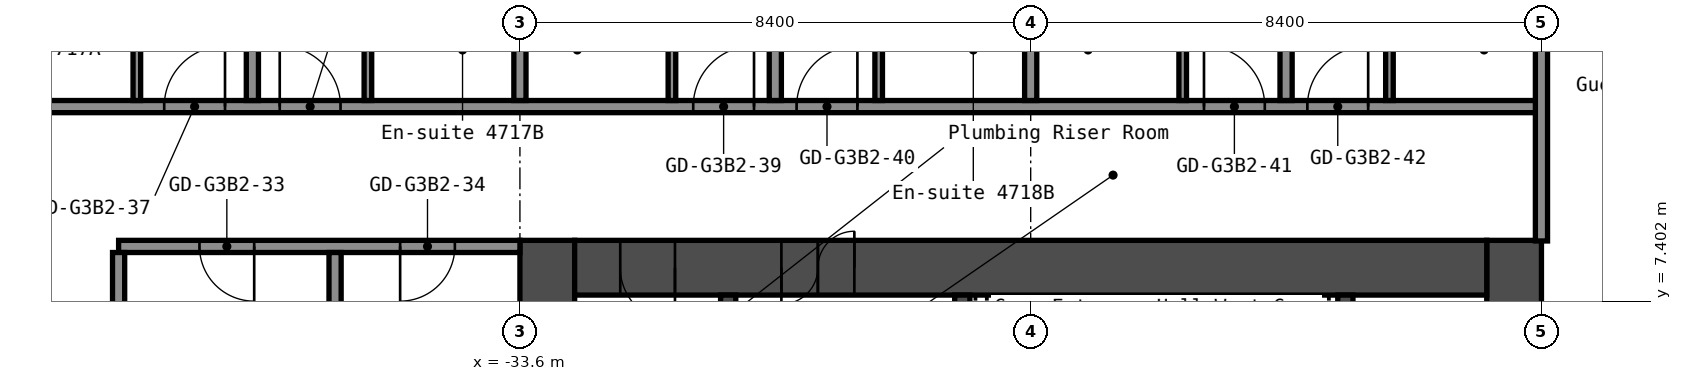
"""IFC4 building model, lengths in metres.
Left out: names, types, materials, properties, quantities, classifications, styles, units other than length and angle.
Written with IfcOpenShell. Run it as: python <this file> out.ifc"""

import sys

from ifc_helpers import new_model, si_unit, direction, frame, frame_2d, origin, place, context, subcontext, project, spatial, rectangle, extrude, element, fill, save


model = new_model("IFC4")
c1 = context("Model", 3, precision=1e-05, world=origin(), true_north=direction((0.0, 1.0)))
c2 = subcontext(c1, "Body", "Model", "MODEL_VIEW")
j1 = project(units=[si_unit("LENGTHUNIT", "METRE"), si_unit("PLANEANGLEUNIT", "RADIAN")], contexts=[c1])
p1 = place(None, origin())
s1 = spatial("IfcSite", under=j1, at=p1, CompositionType="ELEMENT")
p2 = place(p1, origin())
s2 = spatial("IfcBuilding", under=s1, at=p2, CompositionType="ELEMENT")
p3 = place(p2, frame((0.0, 0.0, 166.2)))
s3 = spatial("IfcBuildingStorey", under=s2, at=p3, CompositionType="ELEMENT", Elevation=166.2)
p4 = place(p3, frame((-17.25, -8.4, 0.0), z_axis=(0.0, 0.0, 1.0), x_axis=(0.0, 1.0, 0.0)))
e1 = element("IfcWall", 1, at=p4, inside=s3, PredefinedType="SHEAR", context=c2, shape_type="SweptSolid", body=[
    extrude(rectangle(XDim=16.8, YDim=0.9, at=frame_2d((8.4, 0.0))), origin(), (0.0, 0.0, 1.0), 2.75),
])
p5 = place(p4, frame((7.1, 0.0, 0.0)))
e2 = element("IfcOpeningElement", 2, at=p5, cuts=e1, PredefinedType="OPENING", context=c2, shape_type="SweptSolid", body=[
    extrude(rectangle(XDim=1.6, YDim=2.1, at=frame_2d((0.8, 1.05))), frame((0.0, 0.46, 0.0), z_axis=(0.0, -1.0, 0.0), x_axis=(1.0, 0.0, 0.0)), (0.0, 0.0, 1.0), 0.92),
])
p6 = place(p3, frame((-33.15, -8.4, 0.0), z_axis=(0.0, 0.0, 1.0), x_axis=(0.0, 1.0, 0.0)))
e3 = element("IfcWall", 3, at=p6, inside=s3, PredefinedType="SHEAR", context=c2, shape_type="SweptSolid", body=[
    extrude(rectangle(XDim=16.8, YDim=0.9, at=frame_2d((8.4, 0.0))), origin(), (0.0, 0.0, 1.0), 2.75),
])
p7 = place(p3, frame((-32.7, 7.95, 0.0), z_axis=(0.0, 0.0, 1.0), x_axis=(1.0, 0.0, 0.0)))
e4 = element("IfcWall", 4, at=p7, inside=s3, PredefinedType="SHEAR", context=c2, shape_type="SweptSolid", body=[
    extrude(rectangle(XDim=15.0, YDim=0.9, at=frame_2d((7.5, 0.0))), origin(), (0.0, 0.0, 1.0), 2.75),
])
p8 = place(p7, frame((3.4, 0.0, 0.0)))
e5 = element("IfcOpeningElement", 5, at=p8, cuts=e4, PredefinedType="OPENING", context=c2, shape_type="SweptSolid", body=[
    extrude(rectangle(XDim=1.2, YDim=2.1, at=frame_2d((0.6, 1.05))), frame((0.0, 0.46, 0.0), z_axis=(0.0, -1.0, 0.0), x_axis=(1.0, 0.0, 0.0)), (0.0, 0.0, 1.0), 0.92),
])
p9 = place(p7, frame((0.75, 0.0, 0.0)))
e6 = element("IfcOpeningElement", 6, at=p9, cuts=e4, PredefinedType="OPENING", context=c2, shape_type="SweptSolid", body=[
    extrude(rectangle(XDim=0.9, YDim=2.1, at=frame_2d((0.45, 1.05))), frame((0.0, 0.46, 0.0), z_axis=(0.0, -1.0, 0.0), x_axis=(1.0, 0.0, 0.0)), (0.0, 0.0, 1.0), 0.92),
])
p10 = place(p3, frame((-20.025, 1.2, 0.0), z_axis=(0.0, 0.0, 1.0), x_axis=(0.0, 1.0, 0.0)))
e7 = element("IfcWall", 7, at=p10, inside=s3, PredefinedType="SHEAR", context=c2, shape_type="SweptSolid", body=[
    extrude(rectangle(XDim=6.3, YDim=0.25, at=frame_2d((3.15, 0.0))), origin(), (0.0, 0.0, 1.0), 2.75),
])
p11 = place(p3, frame((-26.325, 3.75, 0.0), z_axis=(0.0, 0.0, 1.0), x_axis=(0.0, 1.0, 0.0)))
e8 = element("IfcWall", 8, at=p11, inside=s3, PredefinedType="SHEAR", context=c2, shape_type="SweptSolid", body=[
    extrude(rectangle(XDim=3.75, YDim=0.25, at=frame_2d((1.875, 0.0))), origin(), (0.0, 0.0, 1.0), 2.75),
])
p12 = place(p11, frame((1.25, 0.0, 0.0)))
e9 = element("IfcOpeningElement", 9, at=p12, cuts=e8, PredefinedType="OPENING", context=c2, shape_type="SweptSolid", body=[
    extrude(rectangle(XDim=1.2, YDim=2.1, at=frame_2d((0.6, 1.05))), frame((0.0, 0.135, 0.0), z_axis=(0.0, -1.0, 0.0), x_axis=(1.0, 0.0, 0.0)), (0.0, 0.0, 1.0), 0.27),
])
p13 = place(p3, frame((-30.175, 1.45, 0.0), z_axis=(0.0, 0.0, 1.0), x_axis=(0.0, 1.0, 0.0)))
e10 = element("IfcWall", 10, at=p13, inside=s3, PredefinedType="SHEAR", context=c2, shape_type="SweptSolid", body=[
    extrude(rectangle(XDim=6.05, YDim=0.25, at=frame_2d((3.025, 0.0))), origin(), (0.0, 0.0, 1.0), 2.75),
])
p14 = place(p13, frame((2.625, 0.0, 0.0)))
e11 = element("IfcOpeningElement", 11, at=p14, cuts=e10, PredefinedType="OPENING", context=c2, shape_type="SweptSolid", body=[
    extrude(rectangle(XDim=1.1, YDim=2.1, at=frame_2d((0.55, 1.05))), frame((0.0, 0.135, 0.0), z_axis=(0.0, -1.0, 0.0), x_axis=(1.0, 0.0, 0.0)), (0.0, 0.0, 1.0), 0.27),
])
p15 = place(p3, frame((-40.2, 8.3, 0.0), z_axis=(0.0, 0.0, 1.0), x_axis=(1.0, 0.0, 0.0)))
e12 = element("IfcWall", 12, at=p15, inside=s3, PredefinedType="PARTITIONING", context=c2, shape_type="SweptSolid", body=[
    extrude(rectangle(XDim=6.6, YDim=0.2, at=frame_2d((3.3, 0.0))), origin(), (0.0, 0.0, 1.0), 2.75),
])
p16 = place(p15, frame((1.33, 0.0, 0.0)))
e13 = element("IfcOpeningElement", 13, at=p16, cuts=e12, PredefinedType="OPENING", context=c2, shape_type="SweptSolid", body=[
    extrude(rectangle(XDim=0.9, YDim=2.1, at=frame_2d((0.45, 1.05))), frame((0.0, 0.11, 0.0), z_axis=(0.0, -1.0, 0.0), x_axis=(1.0, 0.0, 0.0)), (0.0, 0.0, 1.0), 0.22),
])
p17 = place(p15, frame((4.63, 0.0, 0.0)))
e14 = element("IfcOpeningElement", 14, at=p17, cuts=e12, PredefinedType="OPENING", context=c2, shape_type="SweptSolid", body=[
    extrude(rectangle(XDim=0.9, YDim=2.1, at=frame_2d((0.45, 1.05))), frame((0.0, 0.11, 0.0), z_axis=(0.0, -1.0, 0.0), x_axis=(1.0, 0.0, 0.0)), (0.0, 0.0, 1.0), 0.22),
])
p18 = place(p3, frame((-42.7, 10.6, 0.0), z_axis=(0.0, 0.0, 1.0), x_axis=(1.0, 0.0, 0.0)))
e15 = element("IfcWall", 15, at=p18, inside=s3, PredefinedType="PARTITIONING", context=c2, shape_type="SweptSolid", body=[
    extrude(rectangle(XDim=25.9, YDim=0.2, at=frame_2d((12.95, 0.0))), origin(), (0.0, 0.0, 1.0), 2.75),
])
p19 = place(p18, frame((3.25, 0.0, 0.0)))
e16 = element("IfcOpeningElement", 16, at=p19, cuts=e15, PredefinedType="OPENING", context=c2, shape_type="SweptSolid", body=[
    extrude(rectangle(XDim=1.0, YDim=2.1, at=frame_2d((0.5, 1.05))), frame((0.0, 0.11, 0.0), z_axis=(0.0, -1.0, 0.0), x_axis=(1.0, 0.0, 0.0)), (0.0, 0.0, 1.0), 0.22),
])
p20 = place(p18, frame((5.15, 0.0, 0.0)))
e17 = element("IfcOpeningElement", 17, at=p20, cuts=e15, PredefinedType="OPENING", context=c2, shape_type="SweptSolid", body=[
    extrude(rectangle(XDim=1.0, YDim=2.1, at=frame_2d((0.5, 1.05))), frame((0.0, 0.11, 0.0), z_axis=(0.0, -1.0, 0.0), x_axis=(1.0, 0.0, 0.0)), (0.0, 0.0, 1.0), 0.22),
])
p21 = place(p18, frame((11.95, 0.0, 0.0)))
e18 = element("IfcOpeningElement", 18, at=p21, cuts=e15, PredefinedType="OPENING", context=c2, shape_type="SweptSolid", body=[
    extrude(rectangle(XDim=1.0, YDim=2.1, at=frame_2d((0.5, 1.05))), frame((0.0, 0.11, 0.0), z_axis=(0.0, -1.0, 0.0), x_axis=(1.0, 0.0, 0.0)), (0.0, 0.0, 1.0), 0.22),
])
p22 = place(p18, frame((13.65, 0.0, 0.0)))
e19 = element("IfcOpeningElement", 19, at=p22, cuts=e15, PredefinedType="OPENING", context=c2, shape_type="SweptSolid", body=[
    extrude(rectangle(XDim=1.0, YDim=2.1, at=frame_2d((0.5, 1.05))), frame((0.0, 0.11, 0.0), z_axis=(0.0, -1.0, 0.0), x_axis=(1.0, 0.0, 0.0)), (0.0, 0.0, 1.0), 0.22),
])
p23 = place(p18, frame((20.35, 0.0, 0.0)))
e20 = element("IfcOpeningElement", 20, at=p23, cuts=e15, PredefinedType="OPENING", context=c2, shape_type="SweptSolid", body=[
    extrude(rectangle(XDim=1.0, YDim=2.1, at=frame_2d((0.5, 1.05))), frame((0.0, 0.11, 0.0), z_axis=(0.0, -1.0, 0.0), x_axis=(1.0, 0.0, 0.0)), (0.0, 0.0, 1.0), 0.22),
])
p24 = place(p18, frame((22.05, 0.0, 0.0)))
e21 = element("IfcOpeningElement", 21, at=p24, cuts=e15, PredefinedType="OPENING", context=c2, shape_type="SweptSolid", body=[
    extrude(rectangle(XDim=1.0, YDim=2.1, at=frame_2d((0.5, 1.05))), frame((0.0, 0.11, 0.0), z_axis=(0.0, -1.0, 0.0), x_axis=(1.0, 0.0, 0.0)), (0.0, 0.0, 1.0), 0.22),
])
p25 = place(p3, frame((-40.2, -8.2, 0.0), z_axis=(0.0, 0.0, 1.0), x_axis=(0.0, 1.0, 0.0)))
e22 = element("IfcWall", 22, at=p25, inside=s3, PredefinedType="PARTITIONING", context=c2, shape_type="SweptSolid", body=[
    extrude(rectangle(XDim=16.4, YDim=0.2, at=frame_2d((8.2, 0.0))), origin(), (0.0, 0.0, 1.0), 2.75),
])
p26 = place(p3, frame((-39.9, 10.7, 0.0), z_axis=(0.0, 0.0, 1.0), x_axis=(0.0, 1.0, 0.0)))
e23 = element("IfcWall", 23, at=p26, inside=s3, PredefinedType="PARTITIONING", context=c2, shape_type="SweptSolid", body=[
    extrude(rectangle(XDim=2.9, YDim=0.125, at=frame_2d((1.45, 0.0))), origin(), (0.0, 0.0, 1.0), 2.75),
])
p27 = place(p26, frame((1.5, 0.0, 0.0)))
e24 = element("IfcOpeningElement", 24, at=p27, cuts=e23, PredefinedType="OPENING", context=c2, shape_type="SweptSolid", body=[
    extrude(rectangle(XDim=0.8, YDim=2.1, at=frame_2d((0.4, 1.05))), frame((0.0, 0.073, 0.0), z_axis=(0.0, -1.0, 0.0), x_axis=(1.0, 0.0, 0.0)), (0.0, 0.0, 1.0), 0.145),
])
p28 = place(p3, frame((-38.0, 10.7, 0.0), z_axis=(0.0, 0.0, 1.0), x_axis=(0.0, 1.0, 0.0)))
e25 = element("IfcWall", 25, at=p28, inside=s3, PredefinedType="PARTITIONING", context=c2, shape_type="SweptSolid", body=[
    extrude(rectangle(XDim=7.6, YDim=0.2, at=frame_2d((3.8, 0.0))), origin(), (0.0, 0.0, 1.0), 2.75),
])
p29 = place(p3, frame((-36.64, 0.0, 0.0), z_axis=(0.0, 0.0, 1.0), x_axis=(0.0, 1.0, 0.0)))
e26 = element("IfcWall", 26, at=p29, inside=s3, PredefinedType="PARTITIONING", context=c2, shape_type="SweptSolid", body=[
    extrude(rectangle(XDim=8.2, YDim=0.2, at=frame_2d((4.1, 0.0))), origin(), (0.0, 0.0, 1.0), 2.75),
])
p30 = place(p3, frame((-36.1, 10.7, 0.0), z_axis=(0.0, 0.0, 1.0), x_axis=(0.0, 1.0, 0.0)))
e27 = element("IfcWall", 27, at=p30, inside=s3, PredefinedType="PARTITIONING", context=c2, shape_type="SweptSolid", body=[
    extrude(rectangle(XDim=2.9, YDim=0.125, at=frame_2d((1.45, 0.0))), origin(), (0.0, 0.0, 1.0), 2.75),
])
p31 = place(p30, frame((1.5, 0.0, 0.0)))
e28 = element("IfcOpeningElement", 28, at=p31, cuts=e27, PredefinedType="OPENING", context=c2, shape_type="SweptSolid", body=[
    extrude(rectangle(XDim=0.8, YDim=2.1, at=frame_2d((0.4, 1.05))), frame((0.0, 0.073, 0.0), z_axis=(0.0, -1.0, 0.0), x_axis=(1.0, 0.0, 0.0)), (0.0, 0.0, 1.0), 0.145),
])
p32 = place(p3, frame((-33.6, 10.7, 0.0), z_axis=(0.0, 0.0, 1.0), x_axis=(0.0, 1.0, 0.0)))
e29 = element("IfcWall", 29, at=p32, inside=s3, PredefinedType="PARTITIONING", context=c2, shape_type="SweptSolid", body=[
    extrude(rectangle(XDim=7.6, YDim=0.2, at=frame_2d((3.8, 0.0))), origin(), (0.0, 0.0, 1.0), 2.75),
])
p33 = place(p3, frame((-31.1, 10.7, 0.0), z_axis=(0.0, 0.0, 1.0), x_axis=(0.0, 1.0, 0.0)))
e30 = element("IfcWall", 30, at=p33, inside=s3, PredefinedType="PARTITIONING", context=c2, shape_type="SweptSolid", body=[
    extrude(rectangle(XDim=2.9, YDim=0.125, at=frame_2d((1.45, 0.0))), origin(), (0.0, 0.0, 1.0), 2.75),
])
p34 = place(p33, frame((1.5, 0.0, 0.0)))
e31 = element("IfcOpeningElement", 31, at=p34, cuts=e30, PredefinedType="OPENING", context=c2, shape_type="SweptSolid", body=[
    extrude(rectangle(XDim=0.8, YDim=2.1, at=frame_2d((0.4, 1.05))), frame((0.0, 0.073, 0.0), z_axis=(0.0, -1.0, 0.0), x_axis=(1.0, 0.0, 0.0)), (0.0, 0.0, 1.0), 0.145),
])
p35 = place(p3, frame((-29.4, 10.7, 0.0), z_axis=(0.0, 0.0, 1.0), x_axis=(0.0, 1.0, 0.0)))
e32 = element("IfcWall", 32, at=p35, inside=s3, PredefinedType="PARTITIONING", context=c2, shape_type="SweptSolid", body=[
    extrude(rectangle(XDim=7.6, YDim=0.2, at=frame_2d((3.8, 0.0))), origin(), (0.0, 0.0, 1.0), 2.75),
])
p36 = place(p3, frame((-27.7, 10.7, 0.0), z_axis=(0.0, 0.0, 1.0), x_axis=(0.0, 1.0, 0.0)))
e33 = element("IfcWall", 33, at=p36, inside=s3, PredefinedType="PARTITIONING", context=c2, shape_type="SweptSolid", body=[
    extrude(rectangle(XDim=2.9, YDim=0.125, at=frame_2d((1.45, 0.0))), origin(), (0.0, 0.0, 1.0), 2.75),
])
p37 = place(p36, frame((1.5, 0.0, 0.0)))
e34 = element("IfcOpeningElement", 34, at=p37, cuts=e33, PredefinedType="OPENING", context=c2, shape_type="SweptSolid", body=[
    extrude(rectangle(XDim=0.8, YDim=2.1, at=frame_2d((0.4, 1.05))), frame((0.0, 0.073, 0.0), z_axis=(0.0, -1.0, 0.0), x_axis=(1.0, 0.0, 0.0)), (0.0, 0.0, 1.0), 0.145),
])
p38 = place(p3, frame((-25.2, 10.7, 0.0), z_axis=(0.0, 0.0, 1.0), x_axis=(0.0, 1.0, 0.0)))
e35 = element("IfcWall", 35, at=p38, inside=s3, PredefinedType="PARTITIONING", context=c2, shape_type="SweptSolid", body=[
    extrude(rectangle(XDim=7.6, YDim=0.2, at=frame_2d((3.8, 0.0))), origin(), (0.0, 0.0, 1.0), 2.75),
])
p39 = place(p3, frame((-22.7, 10.7, 0.0), z_axis=(0.0, 0.0, 1.0), x_axis=(0.0, 1.0, 0.0)))
e36 = element("IfcWall", 36, at=p39, inside=s3, PredefinedType="PARTITIONING", context=c2, shape_type="SweptSolid", body=[
    extrude(rectangle(XDim=2.9, YDim=0.125, at=frame_2d((1.45, 0.0))), origin(), (0.0, 0.0, 1.0), 2.75),
])
p40 = place(p39, frame((1.5, 0.0, 0.0)))
e37 = element("IfcOpeningElement", 37, at=p40, cuts=e36, PredefinedType="OPENING", context=c2, shape_type="SweptSolid", body=[
    extrude(rectangle(XDim=0.8, YDim=2.1, at=frame_2d((0.4, 1.05))), frame((0.0, 0.073, 0.0), z_axis=(0.0, -1.0, 0.0), x_axis=(1.0, 0.0, 0.0)), (0.0, 0.0, 1.0), 0.145),
])
p41 = place(p3, frame((-21.0, 10.7, 0.0), z_axis=(0.0, 0.0, 1.0), x_axis=(0.0, 1.0, 0.0)))
e38 = element("IfcWall", 38, at=p41, inside=s3, PredefinedType="PARTITIONING", context=c2, shape_type="SweptSolid", body=[
    extrude(rectangle(XDim=7.6, YDim=0.2, at=frame_2d((3.8, 0.0))), origin(), (0.0, 0.0, 1.0), 2.75),
])
p42 = place(p3, frame((-19.3, 10.7, 0.0), z_axis=(0.0, 0.0, 1.0), x_axis=(0.0, 1.0, 0.0)))
e39 = element("IfcWall", 39, at=p42, inside=s3, PredefinedType="PARTITIONING", context=c2, shape_type="SweptSolid", body=[
    extrude(rectangle(XDim=2.9, YDim=0.125, at=frame_2d((1.45, 0.0))), origin(), (0.0, 0.0, 1.0), 2.75),
])
p43 = place(p42, frame((1.5, 0.0, 0.0)))
e40 = element("IfcOpeningElement", 40, at=p43, cuts=e39, PredefinedType="OPENING", context=c2, shape_type="SweptSolid", body=[
    extrude(rectangle(XDim=0.8, YDim=2.1, at=frame_2d((0.4, 1.05))), frame((0.0, 0.073, 0.0), z_axis=(0.0, -1.0, 0.0), x_axis=(1.0, 0.0, 0.0)), (0.0, 0.0, 1.0), 0.145),
])
p44 = place(p3, frame((-16.8, 8.39, 0.0), z_axis=(0.0, 0.0, 1.0), x_axis=(0.0, 1.0, 0.0)))
e41 = element("IfcWall", 41, at=p44, inside=s3, PredefinedType="PARTITIONING", context=c2, shape_type="SweptSolid", body=[
    extrude(rectangle(XDim=9.91, YDim=0.2, at=frame_2d((4.955, 0.0))), origin(), (0.0, 0.0, 1.0), 2.75),
])
p45 = place(p8, origin())
e42 = element("IfcDoor", 42, at=p45, inside=s3, OperationType="DOUBLE_DOOR_SINGLE_SWING", PredefinedType="DOOR", context=c2, shape_type="SweptSolid", body=[
    extrude(rectangle(XDim=1.2, YDim=2.1, at=frame_2d((0.6, 1.05))), frame((0.0, 0.025, 0.0), z_axis=(0.0, -1.0, 0.0), x_axis=(1.0, 0.0, 0.0)), (0.0, 0.0, 1.0), 0.05),
])
fill(e5, e42)
p46 = place(p9, origin())
e43 = element("IfcDoor", 43, at=p46, inside=s3, OperationType="SINGLE_SWING_RIGHT", PredefinedType="DOOR", context=c2, shape_type="SweptSolid", body=[
    extrude(rectangle(XDim=0.9, YDim=2.1, at=frame_2d((0.45, 1.05))), frame((0.0, 0.025, 0.0), z_axis=(0.0, -1.0, 0.0), x_axis=(1.0, 0.0, 0.0)), (0.0, 0.0, 1.0), 0.05),
])
fill(e6, e43)
p47 = place(p16, origin())
e44 = element("IfcDoor", 44, at=p47, inside=s3, OperationType="SINGLE_SWING_RIGHT", PredefinedType="DOOR", context=c2, shape_type="SweptSolid", body=[
    extrude(rectangle(XDim=0.9, YDim=2.1, at=frame_2d((0.45, 1.05))), frame((0.0, 0.025, 0.0), z_axis=(0.0, -1.0, 0.0), x_axis=(1.0, 0.0, 0.0)), (0.0, 0.0, 1.0), 0.05),
])
fill(e13, e44)
p48 = place(p17, origin())
e45 = element("IfcDoor", 45, at=p48, inside=s3, OperationType="SINGLE_SWING_LEFT", PredefinedType="DOOR", context=c2, shape_type="SweptSolid", body=[
    extrude(rectangle(XDim=0.9, YDim=2.1, at=frame_2d((0.45, 1.05))), frame((0.0, 0.025, 0.0), z_axis=(0.0, -1.0, 0.0), x_axis=(1.0, 0.0, 0.0)), (0.0, 0.0, 1.0), 0.05),
])
fill(e14, e45)
p49 = place(p19, origin())
e46 = element("IfcDoor", 46, at=p49, inside=s3, OperationType="SINGLE_SWING_LEFT", PredefinedType="DOOR", context=c2, shape_type="SweptSolid", body=[
    extrude(rectangle(XDim=1.0, YDim=2.1, at=frame_2d((0.5, 1.05))), frame((0.0, 0.025, 0.0), z_axis=(0.0, -1.0, 0.0), x_axis=(1.0, 0.0, 0.0)), (0.0, 0.0, 1.0), 0.05),
])
fill(e16, e46)
p50 = place(p20, origin())
e47 = element("IfcDoor", 47, at=p50, inside=s3, OperationType="SINGLE_SWING_RIGHT", PredefinedType="DOOR", context=c2, shape_type="SweptSolid", body=[
    extrude(rectangle(XDim=1.0, YDim=2.1, at=frame_2d((0.5, 1.05))), frame((0.0, 0.025, 0.0), z_axis=(0.0, -1.0, 0.0), x_axis=(1.0, 0.0, 0.0)), (0.0, 0.0, 1.0), 0.05),
])
fill(e17, e47)
p51 = place(p21, origin())
e48 = element("IfcDoor", 48, at=p51, inside=s3, OperationType="SINGLE_SWING_LEFT", PredefinedType="DOOR", context=c2, shape_type="SweptSolid", body=[
    extrude(rectangle(XDim=1.0, YDim=2.1, at=frame_2d((0.5, 1.05))), frame((0.0, 0.025, 0.0), z_axis=(0.0, -1.0, 0.0), x_axis=(1.0, 0.0, 0.0)), (0.0, 0.0, 1.0), 0.05),
])
fill(e18, e48)
p52 = place(p22, origin())
e49 = element("IfcDoor", 49, at=p52, inside=s3, OperationType="SINGLE_SWING_LEFT", PredefinedType="DOOR", context=c2, shape_type="SweptSolid", body=[
    extrude(rectangle(XDim=1.0, YDim=2.1, at=frame_2d((0.5, 1.05))), frame((0.0, 0.025, 0.0), z_axis=(0.0, -1.0, 0.0), x_axis=(1.0, 0.0, 0.0)), (0.0, 0.0, 1.0), 0.05),
])
fill(e19, e49)
p53 = place(p23, origin())
e50 = element("IfcDoor", 50, at=p53, inside=s3, OperationType="SINGLE_SWING_RIGHT", PredefinedType="DOOR", context=c2, shape_type="SweptSolid", body=[
    extrude(rectangle(XDim=1.0, YDim=2.1, at=frame_2d((0.5, 1.05))), frame((0.0, 0.025, 0.0), z_axis=(0.0, -1.0, 0.0), x_axis=(1.0, 0.0, 0.0)), (0.0, 0.0, 1.0), 0.05),
])
fill(e20, e50)
p54 = place(p24, origin())
e51 = element("IfcDoor", 51, at=p54, inside=s3, OperationType="SINGLE_SWING_LEFT", PredefinedType="DOOR", context=c2, shape_type="SweptSolid", body=[
    extrude(rectangle(XDim=1.0, YDim=2.1, at=frame_2d((0.5, 1.05))), frame((0.0, 0.025, 0.0), z_axis=(0.0, -1.0, 0.0), x_axis=(1.0, 0.0, 0.0)), (0.0, 0.0, 1.0), 0.05),
])
fill(e21, e51)
save(model, sys.argv[1])
